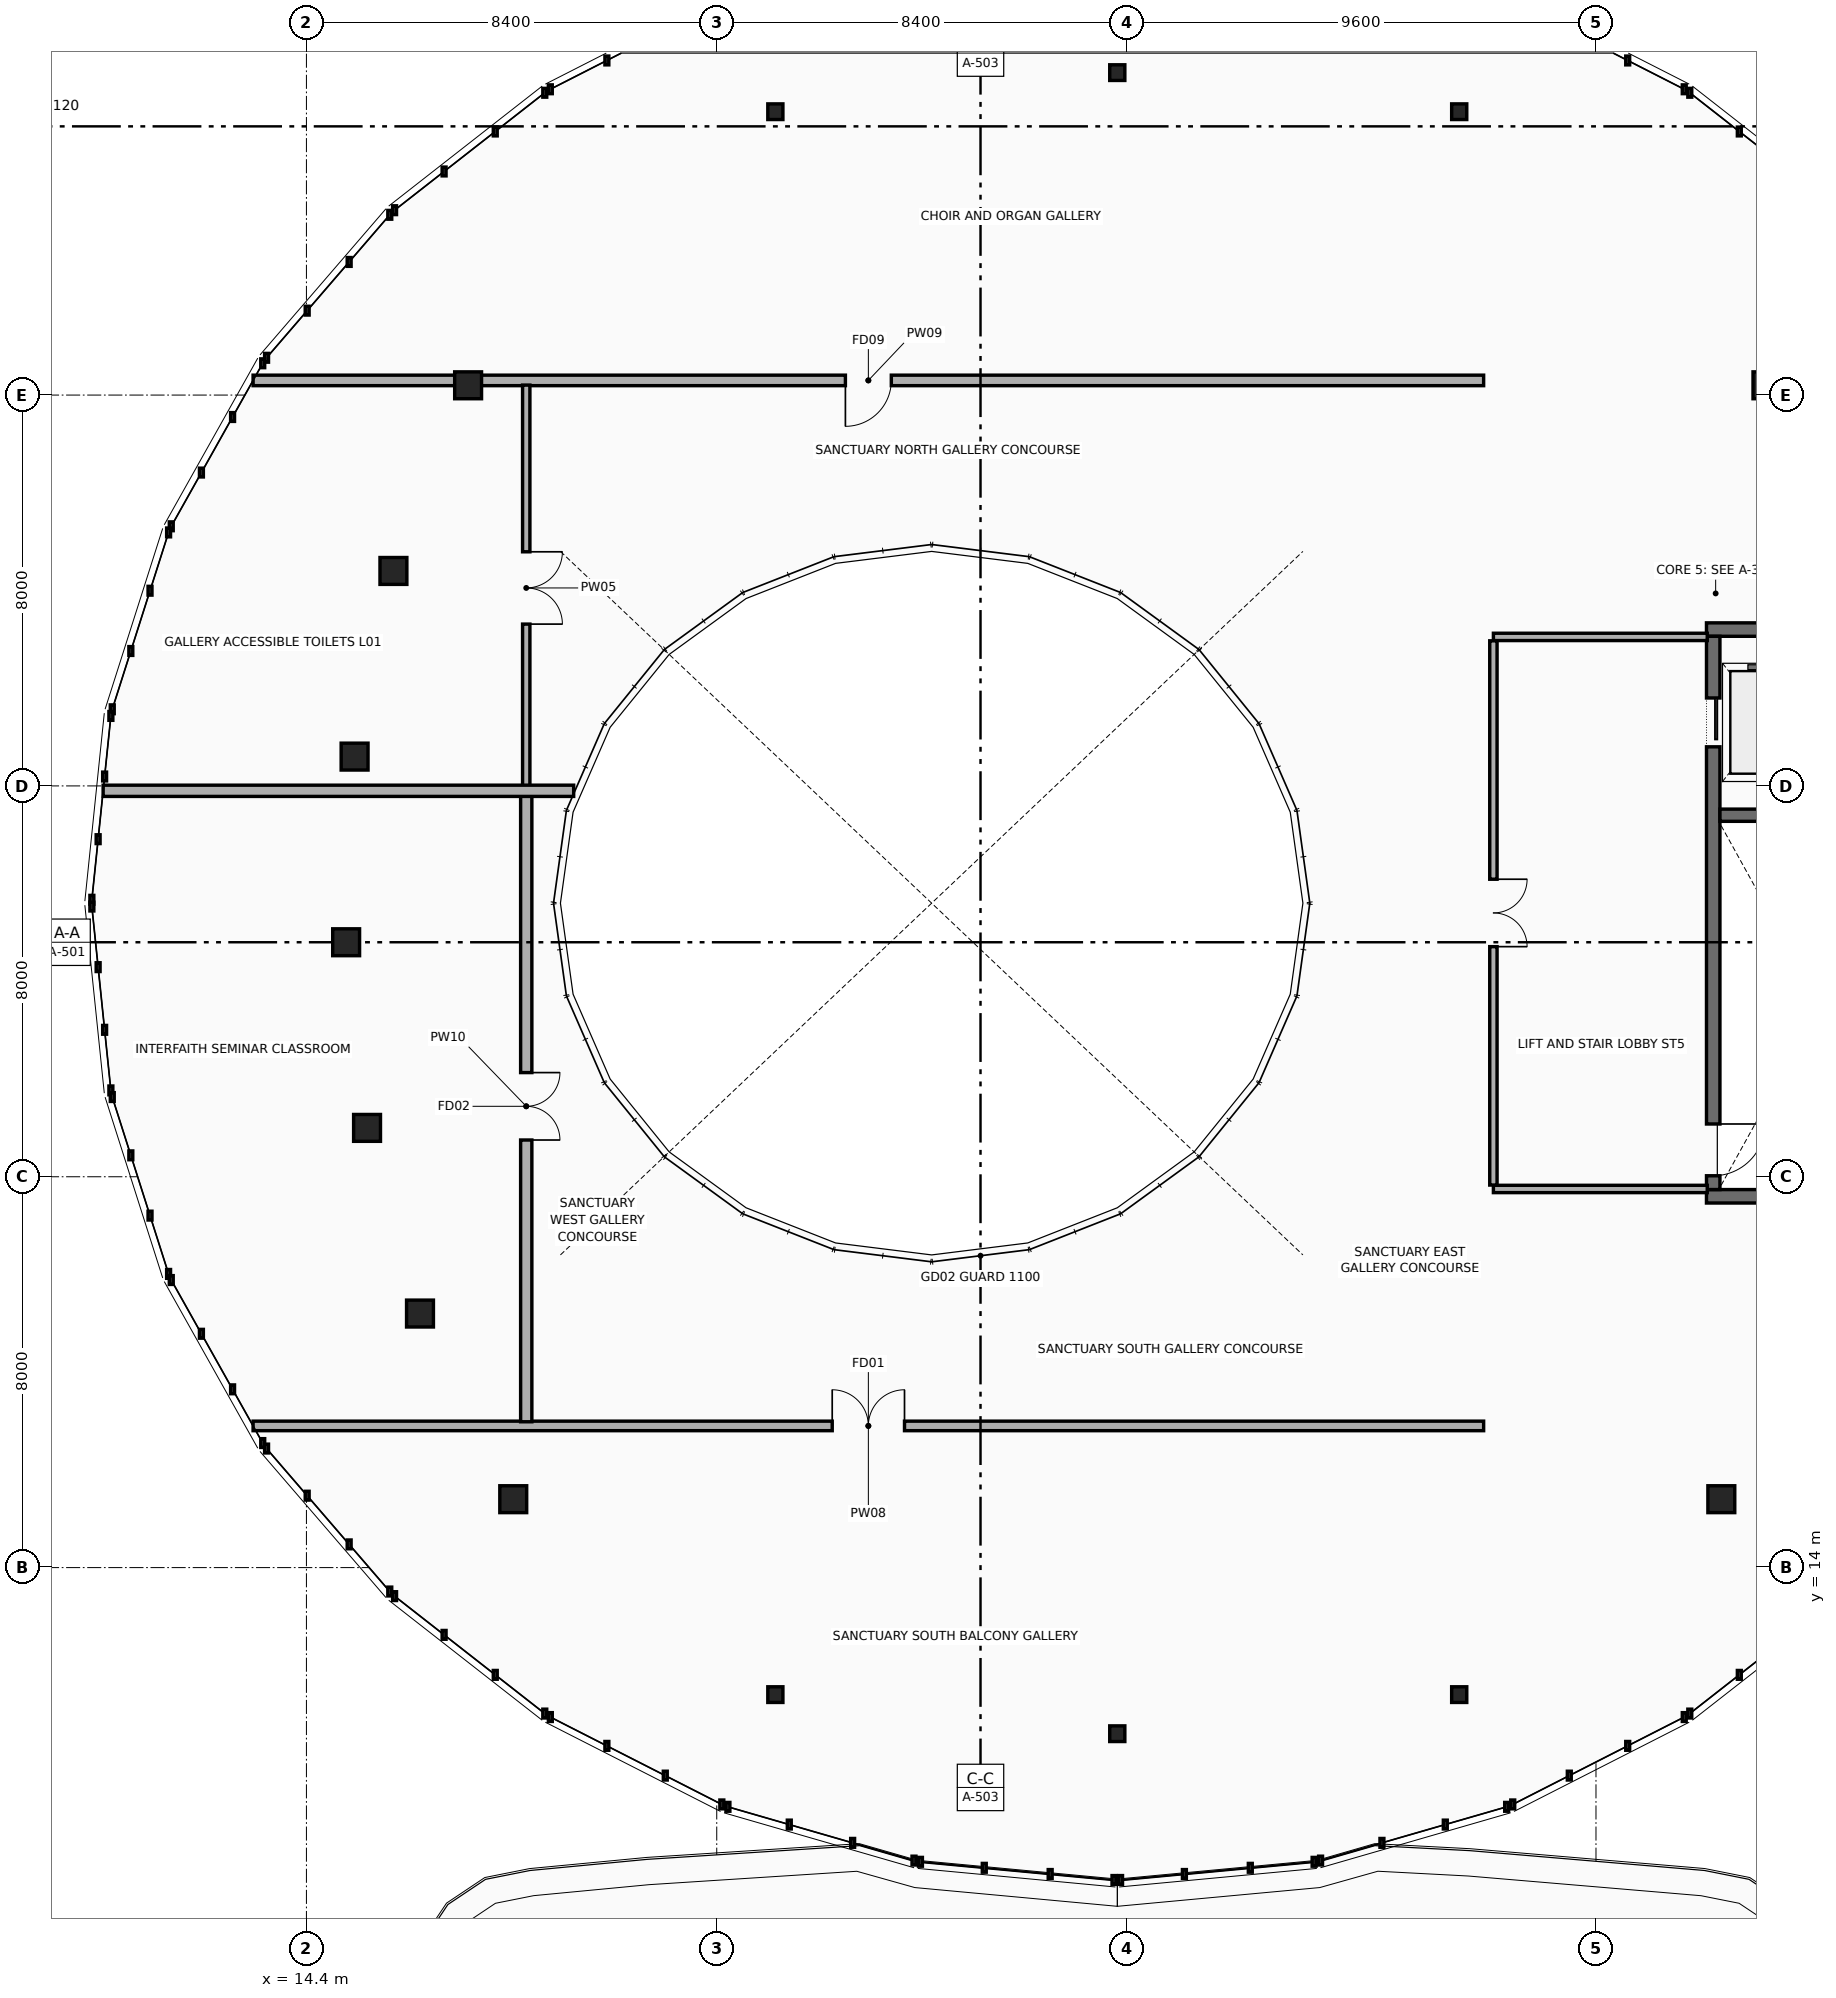
"""IFC4 building model, lengths in metres.
Left out: names, types, materials, properties, quantities, classifications, styles, units other than length and angle.
Written with IfcOpenShell. Run it as: python <this file> out.ifc"""

import sys

from ifc_helpers import new_model, si_unit, direction, frame, frame_2d, origin, origin_2d, place, context, subcontext, project, spatial, rectangle, i_section, extrude, element, fill, save


model = new_model("IFC4")
c1 = context("Model", 3, precision=1e-05, world=origin(), true_north=direction((0.0, 1.0)))
c2 = subcontext(c1, "Body", "Model", "MODEL_VIEW")
j1 = project(units=[si_unit("LENGTHUNIT", "METRE"), si_unit("PLANEANGLEUNIT", "RADIAN")], contexts=[c1])
p1 = place(None, origin())
s1 = spatial("IfcSite", under=j1, at=p1, CompositionType="ELEMENT")
p2 = place(p1, origin())
s2 = spatial("IfcBuilding", under=s1, at=p2, CompositionType="ELEMENT")
p3 = place(p2, frame((0.0, 0.0, 4.8)))
s3 = spatial("IfcBuildingStorey", under=s2, at=p3, CompositionType="ELEMENT", Elevation=4.8)
for number, where, z_axis, x_axis in (
    (1, (43.062, 21.6, 0.0), (0.0, 0.0, 1.0), (1.0, 0.0, 0.0)),
    (2, (47.738, 33.2, 0.0), (0.0, 0.0, 1.0), (-1.0, 0.0, 0.0)),
):
    element("IfcWall", number, at=place(p3, frame(where, z_axis=z_axis, x_axis=x_axis)), inside=s3, PredefinedType="SHEAR", context=c2, shape_type="SweptSolid", body=[
        extrude(rectangle(XDim=4.676, YDim=0.275, at=frame_2d((2.338, 0.0))), origin(), (0.0, 0.0, 1.0), 3.9),
    ])
p4 = place(p3, frame((43.2, 33.062, 0.0), z_axis=(0.0, 0.0, 1.0), x_axis=(0.0, -1.0, 0.0)))
e3 = element("IfcWall", 3, at=p4, inside=s3, PredefinedType="SHEAR", context=c2, shape_type="SweptSolid", body=[
    extrude(rectangle(XDim=11.324, YDim=0.275, at=frame_2d((5.662, 0.0))), origin(), (0.0, 0.0, 1.0), 3.9),
])
p5 = place(p4, frame((1.262, 0.0, 0.0)))
e4 = element("IfcOpeningElement", 4, at=p5, cuts=e3, PredefinedType="OPENING", context=c2, shape_type="SweptSolid", body=[
    extrude(rectangle(XDim=1.0, YDim=2.15, at=frame_2d((0.5, 1.075))), frame((0.0, 0.147, 0.0), z_axis=(0.0, -1.0, 0.0), x_axis=(1.0, 0.0, 0.0)), (0.0, 0.0, 1.0), 0.295),
])
p6 = place(p4, frame((9.982, 0.0, 0.0)))
e5 = element("IfcOpeningElement", 5, at=p6, cuts=e3, PredefinedType="OPENING", context=c2, shape_type="SweptSolid", body=[
    extrude(rectangle(XDim=1.06, YDim=2.15, at=frame_2d((0.53, 1.075))), frame((0.0, 0.147, 0.0), z_axis=(0.0, -1.0, 0.0), x_axis=(1.0, 0.0, 0.0)), (0.0, 0.0, 1.0), 0.295),
])
p7 = place(p3, frame((43.338, 29.4, 0.0), z_axis=(0.0, 0.0, 1.0), x_axis=(1.0, 0.0, 0.0)))
e6 = element("IfcWall", 6, at=p7, inside=s3, PredefinedType="SHEAR", context=c2, shape_type="SweptSolid", body=[
    extrude(rectangle(XDim=4.124, YDim=0.25, at=frame_2d((2.062, 0.0))), origin(), (0.0, 0.0, 1.0), 3.9),
])
for number, where, z_axis, x_axis in (
    (7, (18.634, 15.4, 0.0), (0.0, 0.0, 1.0), (1.0, 0.0, 0.0)),
    (8, (43.366, 15.4, 0.0), (0.0, 0.0, 1.0), (1.0, 0.0, 0.0)),
    (9, (16.725, 19.2, 0.0), (0.0, 0.0, 1.0), (1.0, 0.0, 0.0)),
    (10, (15.641, 23.0, 0.0), (0.0, 0.0, 1.0), (1.0, 0.0, 0.0)),
    (11, (15.213, 26.8, 0.0), (0.0, 0.0, 1.0), (1.0, 0.0, 0.0)),
    (12, (15.386, 30.6, 0.0), (0.0, 0.0, 1.0), (1.0, 0.0, 0.0)),
    (13, (16.181, 34.4, 0.0), (0.0, 0.0, 1.0), (1.0, 0.0, 0.0)),
    (14, (17.71, 38.2, 0.0), (0.0, 0.0, 1.0), (1.0, 0.0, 0.0)),
    (15, (44.29, 38.2, 0.0), (0.0, 0.0, 1.0), (1.0, 0.0, 0.0)),
):
    element("IfcColumn", number, at=place(p3, frame(where, z_axis=z_axis, x_axis=x_axis)), inside=s3, PredefinedType="COLUMN", context=c2, shape_type="SweptSolid", body=[
        extrude(rectangle(XDim=0.55, YDim=0.55, at=origin_2d()), origin(), (0.0, 0.0, 1.0), 3.9),
    ])
for number, where, z_axis, x_axis in (
    (16, (24.0, 11.4, 0.0), (0.0, 0.0, 1.0), (1.0, 0.0, 0.0)),
    (17, (31.0, 10.6, 0.0), (0.0, 0.0, 1.0), (1.0, 0.0, 0.0)),
    (18, (38.0, 11.4, 0.0), (0.0, 0.0, 1.0), (1.0, 0.0, 0.0)),
    (19, (24.0, 43.8, 0.0), (0.0, 0.0, 1.0), (1.0, 0.0, 0.0)),
    (20, (31.0, 44.6, 0.0), (0.0, 0.0, 1.0), (1.0, 0.0, 0.0)),
    (21, (38.0, 43.8, 0.0), (0.0, 0.0, 1.0), (1.0, 0.0, 0.0)),
):
    element("IfcColumn", number, at=place(p3, frame(where, z_axis=z_axis, x_axis=x_axis)), inside=s3, PredefinedType="COLUMN", context=c2, shape_type="SweptSolid", body=[
        extrude(i_section(OverallWidth=0.309, OverallDepth=0.321, WebThickness=0.014, FlangeThickness=0.022, at=origin_2d()), origin(), (0.0, 0.0, 1.0), 3.9),
    ])
for number, where, z_axis, x_axis in (
    (22, (38.7, 21.75, 0.0), (0.0, 0.0, 1.0), (1.0, 0.0, 0.0)),
    (23, (43.078, 33.05, 0.0), (0.0, 0.0, 1.0), (-1.0, 0.0, 0.0)),
):
    element("IfcWall", number, at=place(p3, frame(where, z_axis=z_axis, x_axis=x_axis)), inside=s3, PredefinedType="PARTITIONING", context=c2, shape_type="SweptSolid", body=[
        extrude(rectangle(XDim=4.378, YDim=0.15, at=frame_2d((2.189, 0.0))), origin(), (0.0, 0.0, 1.0), 3.612),
    ])
p8 = place(p3, frame((38.7, 32.97, 0.0), z_axis=(0.0, 0.0, 1.0), x_axis=(0.0, -1.0, 0.0)))
e24 = element("IfcWall", 24, at=p8, inside=s3, PredefinedType="PARTITIONING", context=c2, shape_type="SweptSolid", body=[
    extrude(rectangle(XDim=11.14, YDim=0.15, at=frame_2d((5.57, 0.0))), origin(), (0.0, 0.0, 1.0), 3.612),
])
p9 = place(p8, frame((4.88, 0.0, 0.0)))
e25 = element("IfcOpeningElement", 25, at=p9, cuts=e24, PredefinedType="OPENING", context=c2, shape_type="SweptSolid", body=[
    extrude(rectangle(XDim=1.38, YDim=2.2, at=frame_2d((0.69, 1.1))), frame((0.0, 0.085, 0.0), z_axis=(0.0, -1.0, 0.0), x_axis=(1.0, 0.0, 0.0)), (0.0, 0.0, 1.0), 0.17),
])
p10 = place(p3, frame((13.308, 16.9, 0.0), z_axis=(0.0, 0.0, 1.0), x_axis=(1.0, 0.0, 0.0)))
e26 = element("IfcWall", 26, at=p10, inside=s3, PredefinedType="PARTITIONING", context=c2, shape_type="SweptSolid", body=[
    extrude(rectangle(XDim=25.192, YDim=0.195, at=frame_2d((12.596, 0.0))), origin(), (0.0, 0.0, 1.0), 3.061),
])
p11 = place(p10, frame((11.856, 0.0, 0.0)))
e27 = element("IfcOpeningElement", 27, at=p11, cuts=e26, PredefinedType="OPENING", context=c2, shape_type="SweptSolid", body=[
    extrude(rectangle(XDim=1.48, YDim=2.22, at=frame_2d((0.74, 1.11))), frame((0.0, 0.107, 0.0), z_axis=(0.0, -1.0, 0.0), x_axis=(1.0, 0.0, 0.0)), (0.0, 0.0, 1.0), 0.215),
])
p12 = place(p3, frame((38.5, 38.3, 0.0), z_axis=(0.0, 0.0, 1.0), x_axis=(-1.0, 0.0, 0.0)))
e28 = element("IfcWall", 28, at=p12, inside=s3, PredefinedType="PARTITIONING", context=c2, shape_type="SweptSolid", body=[
    extrude(rectangle(XDim=25.192, YDim=0.215, at=frame_2d((12.596, 0.0))), origin(), (0.0, 0.0, 1.0), 3.061),
])
p13 = place(p12, frame((12.126, 0.0, 0.0)))
e29 = element("IfcOpeningElement", 29, at=p13, cuts=e28, PredefinedType="OPENING", context=c2, shape_type="SweptSolid", body=[
    extrude(rectangle(XDim=0.94, YDim=2.1, at=frame_2d((0.47, 1.05))), frame((0.0, 0.117, 0.0), z_axis=(0.0, -1.0, 0.0), x_axis=(1.0, 0.0, 0.0)), (0.0, 0.0, 1.0), 0.235),
])
p14 = place(p3, frame((18.9, 29.9, 0.0), z_axis=(0.0, 0.0, 1.0), x_axis=(0.0, -1.0, 0.0)))
e30 = element("IfcWall", 30, at=p14, inside=s3, PredefinedType="PARTITIONING", context=c2, shape_type="SweptSolid", body=[
    extrude(rectangle(XDim=12.915, YDim=0.23, at=frame_2d((6.458, 0.0))), origin(), (0.0, 0.0, 1.0), 3.612),
])
p15 = place(p14, frame((5.768, 0.0, 0.0)))
e31 = element("IfcOpeningElement", 31, at=p15, cuts=e30, PredefinedType="OPENING", context=c2, shape_type="SweptSolid", body=[
    extrude(rectangle(XDim=1.38, YDim=2.2, at=frame_2d((0.69, 1.1))), frame((0.0, 0.125, 0.0), z_axis=(0.0, -1.0, 0.0), x_axis=(1.0, 0.0, 0.0)), (0.0, 0.0, 1.0), 0.25),
])
p16 = place(p3, frame((18.9, 38.204, 0.0), z_axis=(0.0, 0.0, 1.0), x_axis=(0.0, -1.0, 0.0)))
e32 = element("IfcWall", 32, at=p16, inside=s3, PredefinedType="PARTITIONING", context=c2, shape_type="SweptSolid", body=[
    extrude(rectangle(XDim=8.304, YDim=0.15, at=frame_2d((4.152, 0.0))), origin(), (0.0, 0.0, 1.0), 3.612),
])
p17 = place(p16, frame((3.412, 0.0, 0.0)))
e33 = element("IfcOpeningElement", 33, at=p17, cuts=e32, PredefinedType="OPENING", context=c2, shape_type="SweptSolid", body=[
    extrude(rectangle(XDim=1.48, YDim=2.22, at=frame_2d((0.74, 1.11))), frame((0.0, 0.085, 0.0), z_axis=(0.0, -1.0, 0.0), x_axis=(1.0, 0.0, 0.0)), (0.0, 0.0, 1.0), 0.17),
])
p18 = place(p3, frame((10.238, 29.9, 0.0), z_axis=(0.0, 0.0, 1.0), x_axis=(1.0, 0.0, 0.0)))
e34 = element("IfcWall", 34, at=p18, inside=s3, PredefinedType="PARTITIONING", context=c2, shape_type="SweptSolid", body=[
    extrude(rectangle(XDim=9.633, YDim=0.23, at=frame_2d((4.816, 0.0))), origin(), (0.0, 0.0, 1.0), 3.061),
])
p19 = place(p5, origin())
e35 = element("IfcDoor", 35, at=p19, inside=s3, OperationType="SLIDING_TO_LEFT", PredefinedType="DOOR", context=c2, shape_type="SweptSolid", body=[
    extrude(rectangle(XDim=1.0, YDim=2.15, at=frame_2d((0.5, 1.075))), frame((0.0, 0.025, 0.0), z_axis=(0.0, -1.0, 0.0), x_axis=(1.0, 0.0, 0.0)), (0.0, 0.0, 1.0), 0.05),
])
fill(e4, e35)
p20 = place(p6, origin())
e36 = element("IfcDoor", 36, at=p20, inside=s3, OperationType="SINGLE_SWING_LEFT", PredefinedType="DOOR", context=c2, shape_type="SweptSolid", body=[
    extrude(rectangle(XDim=1.06, YDim=2.15, at=frame_2d((0.53, 1.075))), frame((0.0, 0.025, 0.0), z_axis=(0.0, -1.0, 0.0), x_axis=(1.0, 0.0, 0.0)), (0.0, 0.0, 1.0), 0.05),
])
fill(e5, e36)
p21 = place(p9, origin())
e37 = element("IfcDoor", 37, at=p21, inside=s3, OperationType="DOUBLE_DOOR_SINGLE_SWING", PredefinedType="DOOR", context=c2, shape_type="SweptSolid", body=[
    extrude(rectangle(XDim=1.38, YDim=2.2, at=frame_2d((0.69, 1.1))), frame((0.0, 0.025, 0.0), z_axis=(0.0, -1.0, 0.0), x_axis=(1.0, 0.0, 0.0)), (0.0, 0.0, 1.0), 0.05),
])
fill(e25, e37)
p22 = place(p11, origin())
e38 = element("IfcDoor", 38, at=p22, inside=s3, OperationType="DOUBLE_DOOR_SINGLE_SWING", PredefinedType="DOOR", context=c2, shape_type="SweptSolid", body=[
    extrude(rectangle(XDim=1.48, YDim=2.22, at=frame_2d((0.74, 1.11))), frame((0.0, 0.025, 0.0), z_axis=(0.0, -1.0, 0.0), x_axis=(1.0, 0.0, 0.0)), (0.0, 0.0, 1.0), 0.05),
])
fill(e27, e38)
p23 = place(p13, origin())
e39 = element("IfcDoor", 39, at=p23, inside=s3, OperationType="SINGLE_SWING_RIGHT", PredefinedType="DOOR", context=c2, shape_type="SweptSolid", body=[
    extrude(rectangle(XDim=0.94, YDim=2.1, at=frame_2d((0.47, 1.05))), frame((0.0, 0.025, 0.0), z_axis=(0.0, -1.0, 0.0), x_axis=(1.0, 0.0, 0.0)), (0.0, 0.0, 1.0), 0.05),
])
fill(e29, e39)
p24 = place(p15, origin())
e40 = element("IfcDoor", 40, at=p24, inside=s3, OperationType="DOUBLE_DOOR_SINGLE_SWING", PredefinedType="DOOR", context=c2, shape_type="SweptSolid", body=[
    extrude(rectangle(XDim=1.38, YDim=2.2, at=frame_2d((0.69, 1.1))), frame((0.0, 0.025, 0.0), z_axis=(0.0, -1.0, 0.0), x_axis=(1.0, 0.0, 0.0)), (0.0, 0.0, 1.0), 0.05),
])
fill(e31, e40)
p25 = place(p17, origin())
e41 = element("IfcDoor", 41, at=p25, inside=s3, OperationType="DOUBLE_DOOR_SINGLE_SWING", PredefinedType="DOOR", context=c2, shape_type="SweptSolid", body=[
    extrude(rectangle(XDim=1.48, YDim=2.22, at=frame_2d((0.74, 1.11))), frame((0.0, 0.025, 0.0), z_axis=(0.0, -1.0, 0.0), x_axis=(1.0, 0.0, 0.0)), (0.0, 0.0, 1.0), 0.05),
])
fill(e33, e41)
save(model, sys.argv[1])
